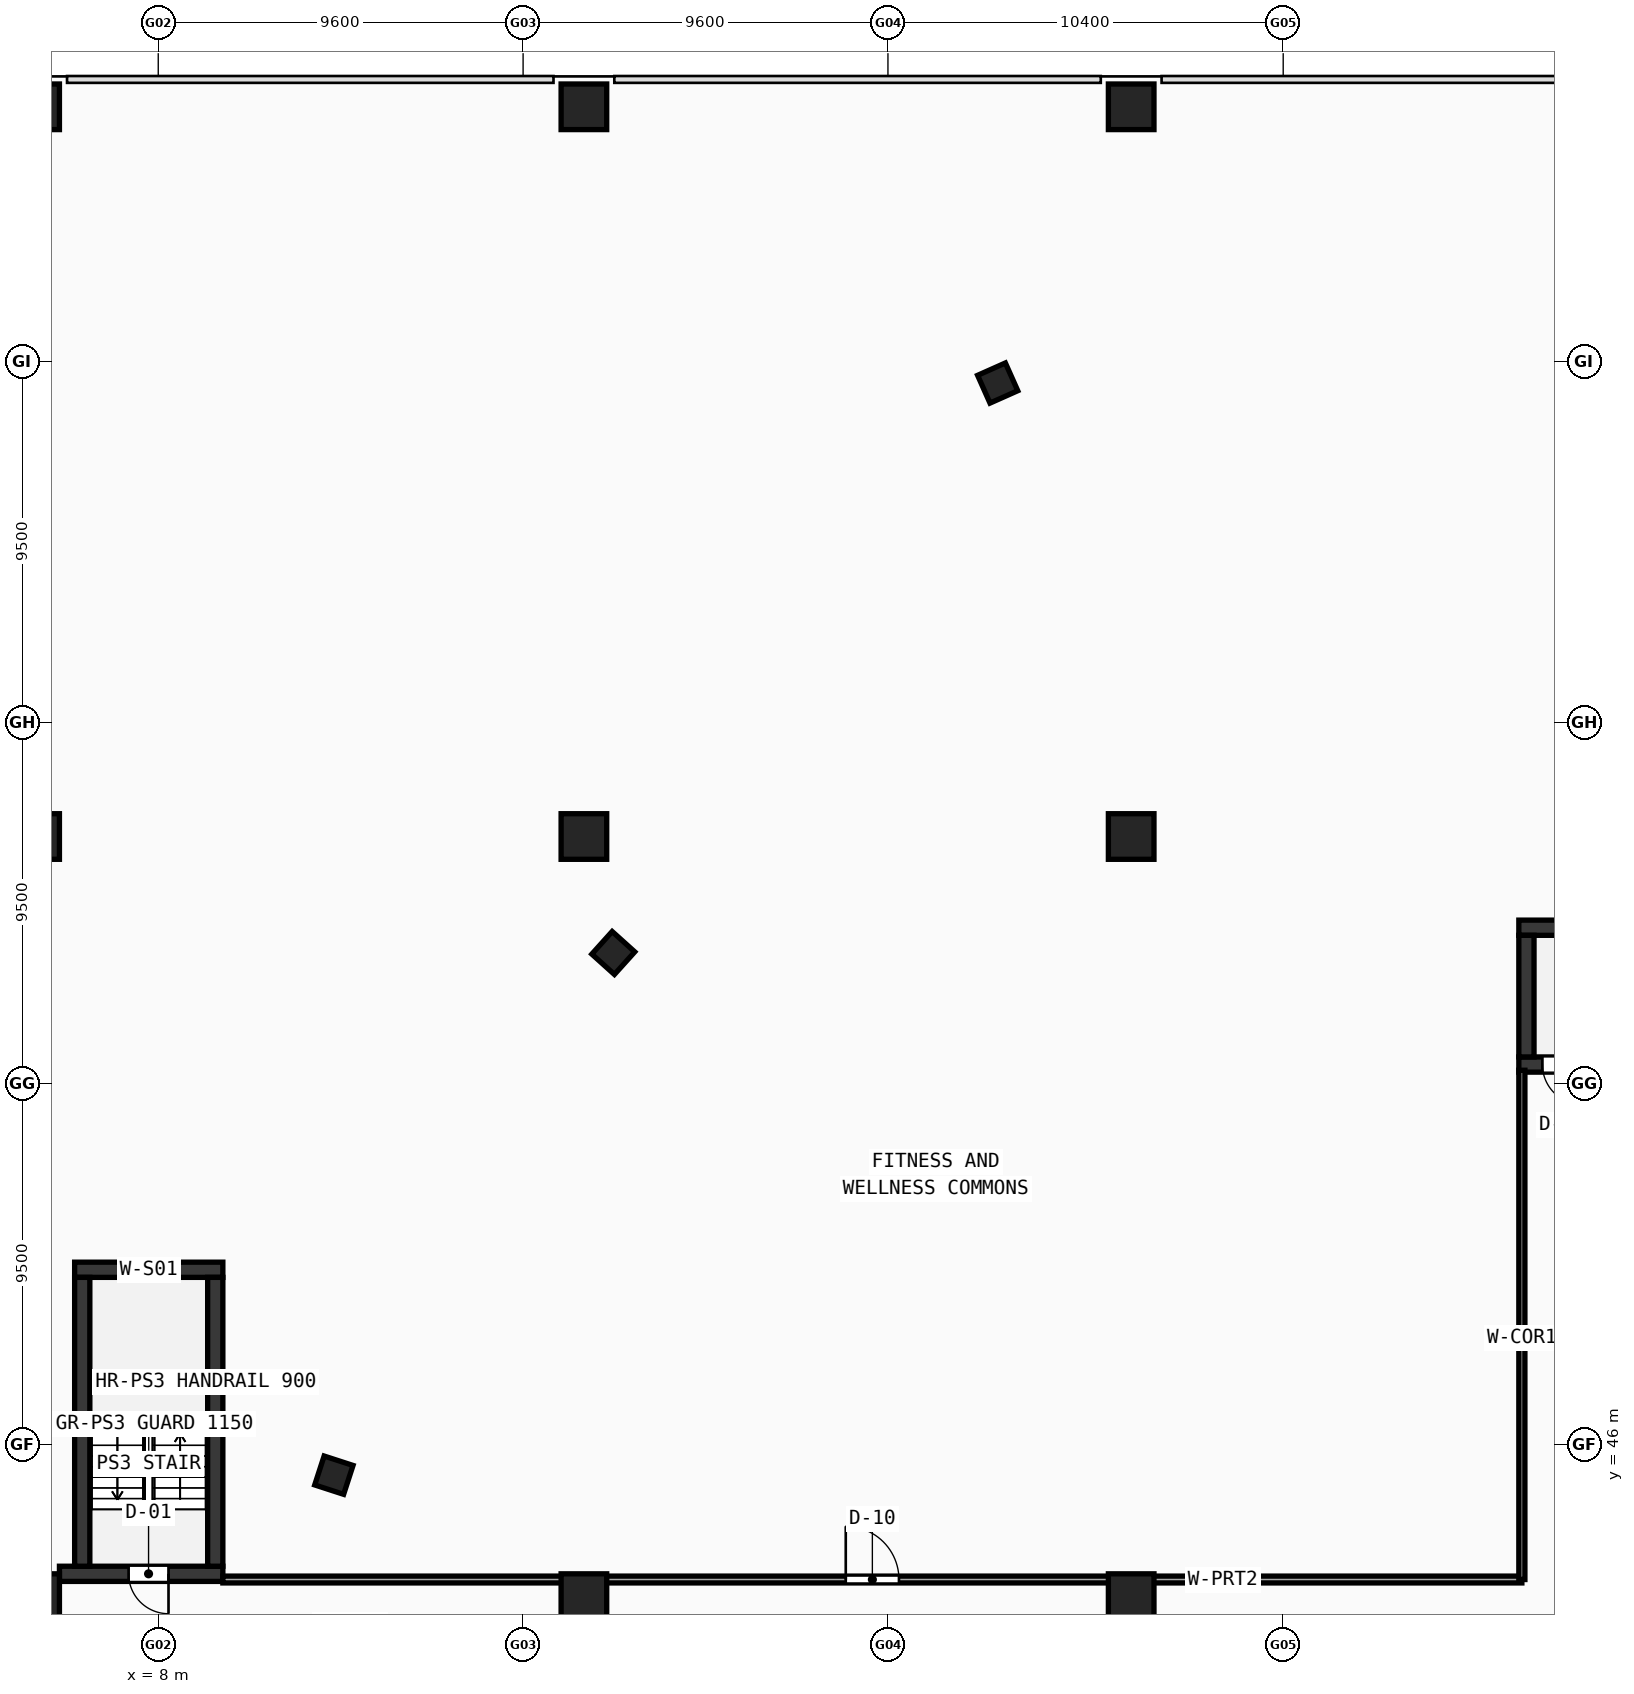
"""IFC4 building model, lengths in metres.
Left out: names, types, materials, properties, quantities, classifications, styles, units other than length and angle.
Written with IfcOpenShell. Run it as: python <this file> out.ifc"""

import sys

from ifc_helpers import new_model, si_unit, direction, frame, frame_2d, origin, origin_with_axes, origin_2d, place, context, subcontext, project, spatial, rectangle, hollow_rectangle, extrude, source, transform, mapped, element, fill, save


model = new_model("IFC4")
c1 = context("Model", 3, precision=1e-05, world=origin(), true_north=direction((0.0, 1.0)))
c2 = subcontext(c1, "Body", "Model", "MODEL_VIEW")
j1 = project(units=[si_unit("LENGTHUNIT", "METRE"), si_unit("PLANEANGLEUNIT", "RADIAN")], contexts=[c1])
p1 = place(None, origin())
s1 = spatial("IfcSite", under=j1, at=p1, CompositionType="ELEMENT")
p2 = place(p1, origin())
s2 = spatial("IfcBuilding", under=s1, at=p2, CompositionType="ELEMENT")
p3 = place(p2, frame((0.0, 0.0, 19.2)))
s3 = spatial("IfcBuildingStorey", under=s2, at=p3, CompositionType="ELEMENT", Elevation=19.2)
p4 = place(p3, frame((5.8, 50.6, 0.0), z_axis=(0.0, 0.0, 1.0), x_axis=(1.0, 0.0, 0.0)))
e1 = element("IfcWall", 1, at=p4, inside=s3, PredefinedType="SHEAR", context=c2, shape_type="SweptSolid", body=[
    extrude(rectangle(XDim=3.9, YDim=0.4, at=frame_2d((1.95, 0.0))), origin(), (0.0, 0.0, 1.0), 5.92),
])
p5 = place(p3, frame((5.4, 42.6, 0.0), z_axis=(0.0, 0.0, 1.0), x_axis=(1.0, 0.0, 0.0)))
e2 = element("IfcWall", 2, at=p5, inside=s3, PredefinedType="SHEAR", context=c2, shape_type="SweptSolid", body=[
    extrude(rectangle(XDim=4.3, YDim=0.4, at=frame_2d((2.15, 0.0))), origin(), (0.0, 0.0, 1.0), 5.92),
])
p6 = place(p5, frame((1.82, 0.0, 0.0)))
e3 = element("IfcOpeningElement", 3, at=p6, cuts=e2, PredefinedType="OPENING", context=c2, shape_type="SweptSolid", body=[
    extrude(rectangle(XDim=1.05, YDim=2.1, at=frame_2d((0.525, 1.05))), frame((0.0, 0.21, 0.0), z_axis=(0.0, -1.0, 0.0), x_axis=(1.0, 0.0, 0.0)), (0.0, 0.0, 1.0), 0.42),
])
for number, where, z_axis, x_axis in (
    (4, (6.0, 42.8, 0.0), (0.0, 0.0, 1.0), (0.0, 1.0, 0.0)),
    (5, (9.5, 42.8, 0.0), (0.0, 0.0, 1.0), (0.0, 1.0, 0.0)),
):
    element("IfcWall", number, at=place(p3, frame(where, z_axis=z_axis, x_axis=x_axis)), inside=s3, PredefinedType="SHEAR", context=c2, shape_type="SweptSolid", body=[
        extrude(rectangle(XDim=7.6, YDim=0.4, at=frame_2d((3.8, 0.0))), origin(), (0.0, 0.0, 1.0), 5.92),
    ])
p7 = place(p3, frame((43.8, 59.6, 0.0), z_axis=(0.0, 0.0, 1.0), x_axis=(1.0, 0.0, 0.0)))
e6 = element("IfcWall", 6, at=p7, inside=s3, PredefinedType="SHEAR", context=c2, shape_type="SweptSolid", body=[
    extrude(rectangle(XDim=8.5, YDim=0.4, at=frame_2d((4.25, 0.0))), origin(), (0.0, 0.0, 1.0), 5.92),
])
p8 = place(p3, frame((43.8, 56.0, 0.0), z_axis=(0.0, 0.0, 1.0), x_axis=(1.0, 0.0, 0.0)))
e7 = element("IfcWall", 7, at=p8, inside=s3, PredefinedType="SHEAR", context=c2, shape_type="SweptSolid", body=[
    extrude(rectangle(XDim=8.5, YDim=0.4, at=frame_2d((4.25, 0.0))), origin(), (0.0, 0.0, 1.0), 5.92),
])
p9 = place(p8, frame((0.62, 0.0, 0.0)))
e8 = element("IfcOpeningElement", 8, at=p9, cuts=e7, PredefinedType="OPENING", context=c2, shape_type="SweptSolid", body=[
    extrude(rectangle(XDim=1.05, YDim=2.1, at=frame_2d((0.525, 1.05))), frame((0.0, 0.21, 0.0), z_axis=(0.0, -1.0, 0.0), x_axis=(1.0, 0.0, 0.0)), (0.0, 0.0, 1.0), 0.42),
])
p10 = place(p3, frame((44.0, 56.2, 0.0), z_axis=(0.0, 0.0, 1.0), x_axis=(0.0, 1.0, 0.0)))
e9 = element("IfcWall", 9, at=p10, inside=s3, PredefinedType="SHEAR", context=c2, shape_type="SweptSolid", body=[
    extrude(rectangle(XDim=3.2, YDim=0.4, at=frame_2d((1.6, 0.0))), origin(), (0.0, 0.0, 1.0), 5.92),
])
m1 = source(origin(), c2, "Body", "SweptSolid", [
    extrude(hollow_rectangle(XDim=1.2, YDim=1.2, WallThickness=0.05, at=origin_2d()), origin(), (0.0, 0.0, 1.0), 6.2),
])
for number, where, z_axis, x_axis in (
    (10, (4.8, 42.0, -0.28), (0.0, 0.0, 1.0), (1.0, 0.0, 0.0)),
    (11, (4.8, 62.0, -0.28), (0.0, 0.0, 1.0), (1.0, 0.0, 0.0)),
    (12, (4.8, 81.2, -0.28), (0.0, 0.0, 1.0), (1.0, 0.0, 0.0)),
    (13, (19.2, 42.0, -0.28), (0.0, 0.0, 1.0), (1.0, 0.0, 0.0)),
    (14, (19.2, 62.0, -0.28), (0.0, 0.0, 1.0), (1.0, 0.0, 0.0)),
    (15, (19.2, 81.2, -0.28), (0.0, 0.0, 1.0), (1.0, 0.0, 0.0)),
    (16, (33.6, 42.0, -0.28), (0.0, 0.0, 1.0), (1.0, 0.0, 0.0)),
    (17, (33.6, 62.0, -0.28), (0.0, 0.0, 1.0), (1.0, 0.0, 0.0)),
    (18, (33.6, 81.2, -0.28), (0.0, 0.0, 1.0), (1.0, 0.0, 0.0)),
):
    element("IfcColumn", number, at=place(p3, frame(where, z_axis=z_axis, x_axis=x_axis)), inside=s3, PredefinedType="COLUMN", context=c2, shape_type="MappedRepresentation", body=[
        mapped(m1, transform((0.0, 0.0, 0.0), scale=1.0)),
    ])
m2 = source(origin(), c2, "Body", "SweptSolid", [
    extrude(hollow_rectangle(XDim=0.8, YDim=0.8, WallThickness=0.032, at=origin_2d()), origin(), (0.0, 0.0, 1.0), 6.2),
])
for number, where, z_axis, x_axis in (
    (19, (30.088, 73.932, -0.28), (0.0, 0.0, 1.0), (-0.914, -0.407, 0.0)),
    (20, (19.973, 58.935, -0.28), (0.0, 0.0, 1.0), (-0.669, -0.743, 0.0)),
    (21, (12.621, 45.196, -0.28), (0.0, 0.0, 1.0), (-0.309, -0.951, 0.0)),
):
    element("IfcColumn", number, at=place(p3, frame(where, z_axis=z_axis, x_axis=x_axis)), inside=s3, PredefinedType="COLUMN", context=c2, shape_type="MappedRepresentation", body=[
        mapped(m2, transform((0.0, 0.0, 0.0), scale=1.0)),
    ])
p11 = place(p3, frame((9.7, 42.45, 0.0), z_axis=(0.0, 0.0, 1.0), x_axis=(1.0, 0.0, 0.0)))
e22 = element("IfcWall", 22, at=p11, inside=s3, PredefinedType="PARTITIONING", context=c2, shape_type="SweptSolid", body=[
    extrude(rectangle(XDim=34.18, YDim=0.18, at=frame_2d((17.09, 0.0))), origin(), (0.0, 0.0, 1.0), 2.42),
])
p12 = place(p11, frame((16.39, 0.0, 0.0)))
e23 = element("IfcOpeningElement", 23, at=p12, cuts=e22, PredefinedType="OPENING", context=c2, shape_type="SweptSolid", body=[
    extrude(rectangle(XDim=1.4, YDim=2.15, at=frame_2d((0.7, 1.075))), frame((0.0, 0.1, 0.0), z_axis=(0.0, -1.0, 0.0), x_axis=(1.0, 0.0, 0.0)), (0.0, 0.0, 1.0), 0.2),
])
p13 = place(p3, frame((43.88, 42.45, 0.0), z_axis=(0.0, 0.0, 1.0), x_axis=(0.0, 1.0, 0.0)))
e24 = element("IfcWall", 24, at=p13, inside=s3, PredefinedType="PARTITIONING", context=c2, shape_type="SweptSolid", body=[
    extrude(rectangle(XDim=13.4, YDim=0.16, at=frame_2d((6.7, 0.0))), origin(), (0.0, 0.0, 1.0), 2.42),
])
m3 = source(origin(), c2, "Body", "SweptSolid", [
    extrude(rectangle(XDim=1.05, YDim=2.1, at=frame_2d((0.525, 1.05))), frame((0.0, 0.025, 0.0), z_axis=(0.0, -1.0, 0.0), x_axis=(1.0, 0.0, 0.0)), (0.0, 0.0, 1.0), 0.05),
])
p14 = place(p6, frame((1.05, 0.0, 0.0), z_axis=(0.0, 0.0, 1.0), x_axis=(-1.0, 0.0, 0.0)))
e25 = element("IfcDoor", 25, at=p14, inside=s3, OperationType="SINGLE_SWING_LEFT", PredefinedType="DOOR", context=c2, shape_type="MappedRepresentation", body=[
    mapped(m3, transform((0.0, 0.0, 0.0), scale=1.0)),
])
fill(e3, e25)
p15 = place(p9, frame((1.05, 0.0, 0.0), z_axis=(0.0, 0.0, 1.0), x_axis=(-1.0, 0.0, 0.0)))
e26 = element("IfcDoor", 26, at=p15, inside=s3, OperationType="SINGLE_SWING_LEFT", PredefinedType="DOOR", context=c2, shape_type="MappedRepresentation", body=[
    mapped(m3, transform((0.0, 0.0, 0.0), scale=1.0)),
])
fill(e8, e26)
m4 = source(origin(), c2, "Body", "SweptSolid", [
    extrude(rectangle(XDim=1.4, YDim=2.15, at=frame_2d((0.7, 1.075))), frame((0.0, 0.025, 0.0), z_axis=(0.0, -1.0, 0.0), x_axis=(1.0, 0.0, 0.0)), (0.0, 0.0, 1.0), 0.05),
])
p16 = place(p12, origin_with_axes())
e27 = element("IfcDoor", 27, at=p16, inside=s3, OperationType="SINGLE_SWING_LEFT", PredefinedType="DOOR", context=c2, shape_type="MappedRepresentation", body=[
    mapped(m4, transform((0.0, 0.0, 0.0), scale=1.0)),
])
fill(e23, e27)
save(model, sys.argv[1])
